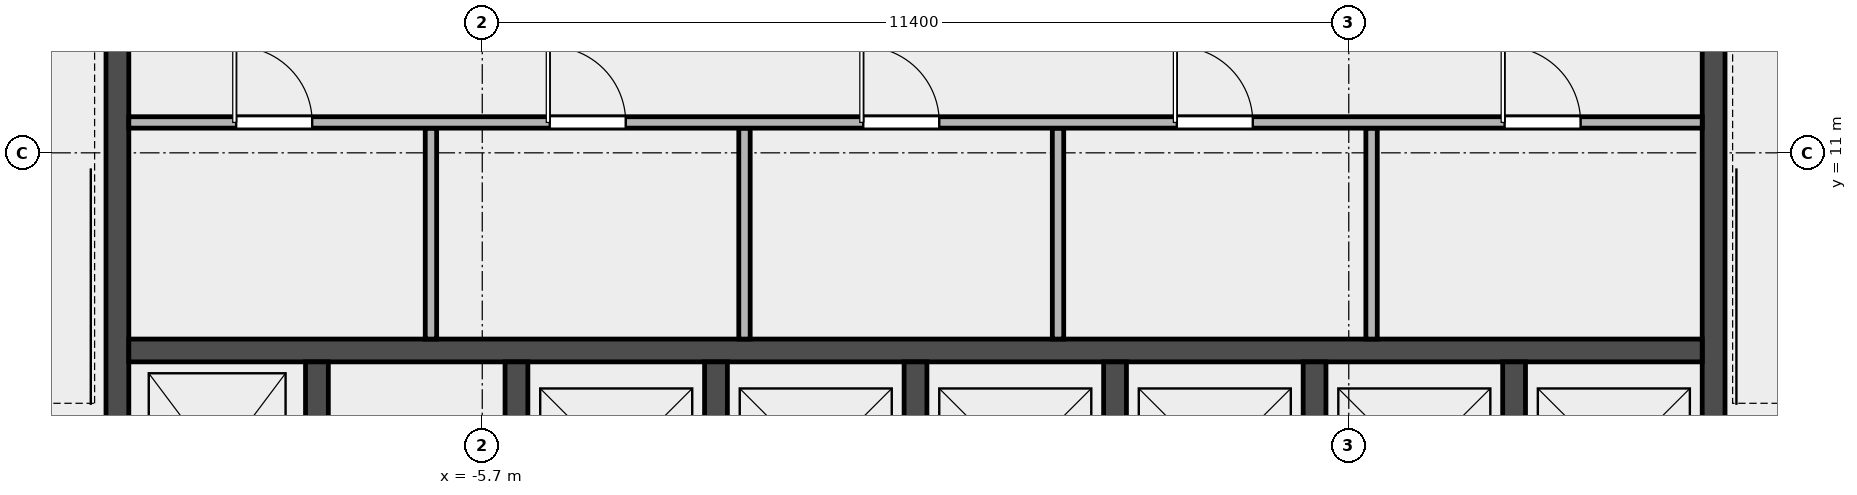
"""IFC4 building model, lengths in metres.
Left out: names, types, materials, properties, quantities, classifications, styles, units other than length and angle.
Written with IfcOpenShell. Run it as: python <this file> out.ifc"""

import sys

from ifc_helpers import new_model, si_unit, direction, frame, frame_2d, origin, place, context, subcontext, project, spatial, rectangle, extrude, element, fill, save


model = new_model("IFC4")
c1 = context("Model", 3, precision=1e-05, world=origin(), true_north=direction((0.0, 1.0)))
c2 = subcontext(c1, "Body", "Model", "MODEL_VIEW")
j1 = project(units=[si_unit("LENGTHUNIT", "METRE"), si_unit("PLANEANGLEUNIT", "RADIAN")], contexts=[c1])
p1 = place(None, origin())
s1 = spatial("IfcSite", under=j1, at=p1, CompositionType="ELEMENT")
p2 = place(p1, origin())
s2 = spatial("IfcBuilding", under=s1, at=p2, CompositionType="ELEMENT")
p3 = place(p2, frame((0.0, 0.0, 235.0)))
s3 = spatial("IfcBuildingStorey", under=s2, at=p3, CompositionType="ELEMENT", Elevation=235.0)
for number, where, z_axis, x_axis in (
    (1, (-10.5, 5.25, 0.0), (0.0, 0.0, 1.0), (0.0, 1.0, 0.0)),
    (2, (10.5, 5.25, 0.0), (0.0, 0.0, 1.0), (0.0, 1.0, 0.0)),
):
    element("IfcWall", number, at=place(p3, frame(where, z_axis=z_axis, x_axis=x_axis)), inside=s3, PredefinedType="SHEAR", context=c2, shape_type="SweptSolid", body=[
        extrude(rectangle(XDim=7.65, YDim=0.3, at=frame_2d((3.825, 0.0))), origin(), (0.0, 0.0, 1.0), 3.7),
    ])
p4 = place(p3, frame((-10.35, 8.4, 0.0), z_axis=(0.0, 0.0, 1.0), x_axis=(1.0, 0.0, 0.0)))
e3 = element("IfcWall", 3, at=p4, inside=s3, PredefinedType="SOLIDWALL", context=c2, shape_type="SweptSolid", body=[
    extrude(rectangle(XDim=20.7, YDim=0.3, at=frame_2d((10.35, 0.0))), origin(), (0.0, 0.0, 1.0), 3.7),
])
for number, where, z_axis, x_axis in (
    (4, (-7.875, 5.55, 0.0), (0.0, 0.0, 1.0), (0.0, 1.0, 0.0)),
    (5, (-5.25, 5.55, 0.0), (0.0, 0.0, 1.0), (0.0, 1.0, 0.0)),
    (6, (-2.625, 5.55, 0.0), (0.0, 0.0, 1.0), (0.0, 1.0, 0.0)),
    (7, (0.0, 5.55, 0.0), (0.0, 0.0, 1.0), (0.0, 1.0, 0.0)),
    (8, (2.625, 5.55, 0.0), (0.0, 0.0, 1.0), (0.0, 1.0, 0.0)),
    (9, (5.25, 5.55, 0.0), (0.0, 0.0, 1.0), (0.0, 1.0, 0.0)),
    (10, (7.875, 5.55, 0.0), (0.0, 0.0, 1.0), (0.0, 1.0, 0.0)),
):
    element("IfcWall", number, at=place(p3, frame(where, z_axis=z_axis, x_axis=x_axis)), inside=s3, PredefinedType="SOLIDWALL", context=c2, shape_type="SweptSolid", body=[
        extrude(rectangle(XDim=2.7, YDim=0.3, at=frame_2d((1.35, 0.0))), origin(), (0.0, 0.0, 1.0), 3.7),
    ])
for number, where, z_axis, x_axis in (
    (11, (-6.375, 8.55, 0.0), (0.0, 0.0, 1.0), (0.0, 1.0, 0.0)),
    (12, (-2.25, 8.55, 0.0), (0.0, 0.0, 1.0), (0.0, 1.0, 0.0)),
    (13, (1.875, 8.55, 0.0), (0.0, 0.0, 1.0), (0.0, 1.0, 0.0)),
    (14, (6.0, 8.55, 0.0), (0.0, 0.0, 1.0), (0.0, 1.0, 0.0)),
):
    element("IfcWall", number, at=place(p3, frame(where, z_axis=z_axis, x_axis=x_axis)), inside=s3, PredefinedType="PARTITIONING", context=c2, shape_type="SweptSolid", body=[
        extrude(rectangle(XDim=2.775, YDim=0.15, at=frame_2d((1.387, 0.0))), origin(), (0.0, 0.0, 1.0), 3.7),
    ])
p5 = place(p3, frame((-10.35, 11.4, 0.0), z_axis=(0.0, 0.0, 1.0), x_axis=(1.0, 0.0, 0.0)))
e15 = element("IfcWall", 15, at=p5, inside=s3, PredefinedType="PARTITIONING", context=c2, shape_type="SweptSolid", body=[
    extrude(rectangle(XDim=20.7, YDim=0.15, at=frame_2d((10.35, 0.0))), origin(), (0.0, 0.0, 1.0), 3.7),
])
p6 = place(p5, frame((1.413, 0.0, 0.0)))
e16 = element("IfcOpeningElement", 16, at=p6, cuts=e15, PredefinedType="OPENING", context=c2, shape_type="SweptSolid", body=[
    extrude(rectangle(XDim=1.0, YDim=2.1, at=frame_2d((0.5, 1.05))), frame((0.0, 0.087, 0.0), z_axis=(0.0, -1.0, 0.0), x_axis=(1.0, 0.0, 0.0)), (0.0, 0.0, 1.0), 0.174),
])
p7 = place(p5, frame((5.538, 0.0, 0.0)))
e17 = element("IfcOpeningElement", 17, at=p7, cuts=e15, PredefinedType="OPENING", context=c2, shape_type="SweptSolid", body=[
    extrude(rectangle(XDim=1.0, YDim=2.1, at=frame_2d((0.5, 1.05))), frame((0.0, 0.087, 0.0), z_axis=(0.0, -1.0, 0.0), x_axis=(1.0, 0.0, 0.0)), (0.0, 0.0, 1.0), 0.174),
])
p8 = place(p5, frame((9.663, 0.0, 0.0)))
e18 = element("IfcOpeningElement", 18, at=p8, cuts=e15, PredefinedType="OPENING", context=c2, shape_type="SweptSolid", body=[
    extrude(rectangle(XDim=1.0, YDim=2.1, at=frame_2d((0.5, 1.05))), frame((0.0, 0.087, 0.0), z_axis=(0.0, -1.0, 0.0), x_axis=(1.0, 0.0, 0.0)), (0.0, 0.0, 1.0), 0.174),
])
p9 = place(p5, frame((13.788, 0.0, 0.0)))
e19 = element("IfcOpeningElement", 19, at=p9, cuts=e15, PredefinedType="OPENING", context=c2, shape_type="SweptSolid", body=[
    extrude(rectangle(XDim=1.0, YDim=2.1, at=frame_2d((0.5, 1.05))), frame((0.0, 0.087, 0.0), z_axis=(0.0, -1.0, 0.0), x_axis=(1.0, 0.0, 0.0)), (0.0, 0.0, 1.0), 0.174),
])
p10 = place(p5, frame((18.1, 0.0, 0.0)))
e20 = element("IfcOpeningElement", 20, at=p10, cuts=e15, PredefinedType="OPENING", context=c2, shape_type="SweptSolid", body=[
    extrude(rectangle(XDim=1.0, YDim=2.1, at=frame_2d((0.5, 1.05))), frame((0.0, 0.087, 0.0), z_axis=(0.0, -1.0, 0.0), x_axis=(1.0, 0.0, 0.0)), (0.0, 0.0, 1.0), 0.174),
])
p11 = place(p6, origin())
e21 = element("IfcDoor", 21, at=p11, inside=s3, OperationType="SINGLE_SWING_LEFT", PredefinedType="DOOR", context=c2, shape_type="SweptSolid", body=[
    extrude(rectangle(XDim=1.0, YDim=2.1, at=frame_2d((0.5, 1.05))), frame((0.0, 0.025, 0.0), z_axis=(0.0, -1.0, 0.0), x_axis=(1.0, 0.0, 0.0)), (0.0, 0.0, 1.0), 0.05),
])
fill(e16, e21)
p12 = place(p7, origin())
e22 = element("IfcDoor", 22, at=p12, inside=s3, OperationType="SINGLE_SWING_LEFT", PredefinedType="DOOR", context=c2, shape_type="SweptSolid", body=[
    extrude(rectangle(XDim=1.0, YDim=2.1, at=frame_2d((0.5, 1.05))), frame((0.0, 0.025, 0.0), z_axis=(0.0, -1.0, 0.0), x_axis=(1.0, 0.0, 0.0)), (0.0, 0.0, 1.0), 0.05),
])
fill(e17, e22)
p13 = place(p8, origin())
e23 = element("IfcDoor", 23, at=p13, inside=s3, OperationType="SINGLE_SWING_LEFT", PredefinedType="DOOR", context=c2, shape_type="SweptSolid", body=[
    extrude(rectangle(XDim=1.0, YDim=2.1, at=frame_2d((0.5, 1.05))), frame((0.0, 0.025, 0.0), z_axis=(0.0, -1.0, 0.0), x_axis=(1.0, 0.0, 0.0)), (0.0, 0.0, 1.0), 0.05),
])
fill(e18, e23)
p14 = place(p9, origin())
e24 = element("IfcDoor", 24, at=p14, inside=s3, OperationType="SINGLE_SWING_LEFT", PredefinedType="DOOR", context=c2, shape_type="SweptSolid", body=[
    extrude(rectangle(XDim=1.0, YDim=2.1, at=frame_2d((0.5, 1.05))), frame((0.0, 0.025, 0.0), z_axis=(0.0, -1.0, 0.0), x_axis=(1.0, 0.0, 0.0)), (0.0, 0.0, 1.0), 0.05),
])
fill(e19, e24)
p15 = place(p10, origin())
e25 = element("IfcDoor", 25, at=p15, inside=s3, OperationType="SINGLE_SWING_LEFT", PredefinedType="DOOR", context=c2, shape_type="SweptSolid", body=[
    extrude(rectangle(XDim=1.0, YDim=2.1, at=frame_2d((0.5, 1.05))), frame((0.0, 0.025, 0.0), z_axis=(0.0, -1.0, 0.0), x_axis=(1.0, 0.0, 0.0)), (0.0, 0.0, 1.0), 0.05),
])
fill(e20, e25)
save(model, sys.argv[1])
